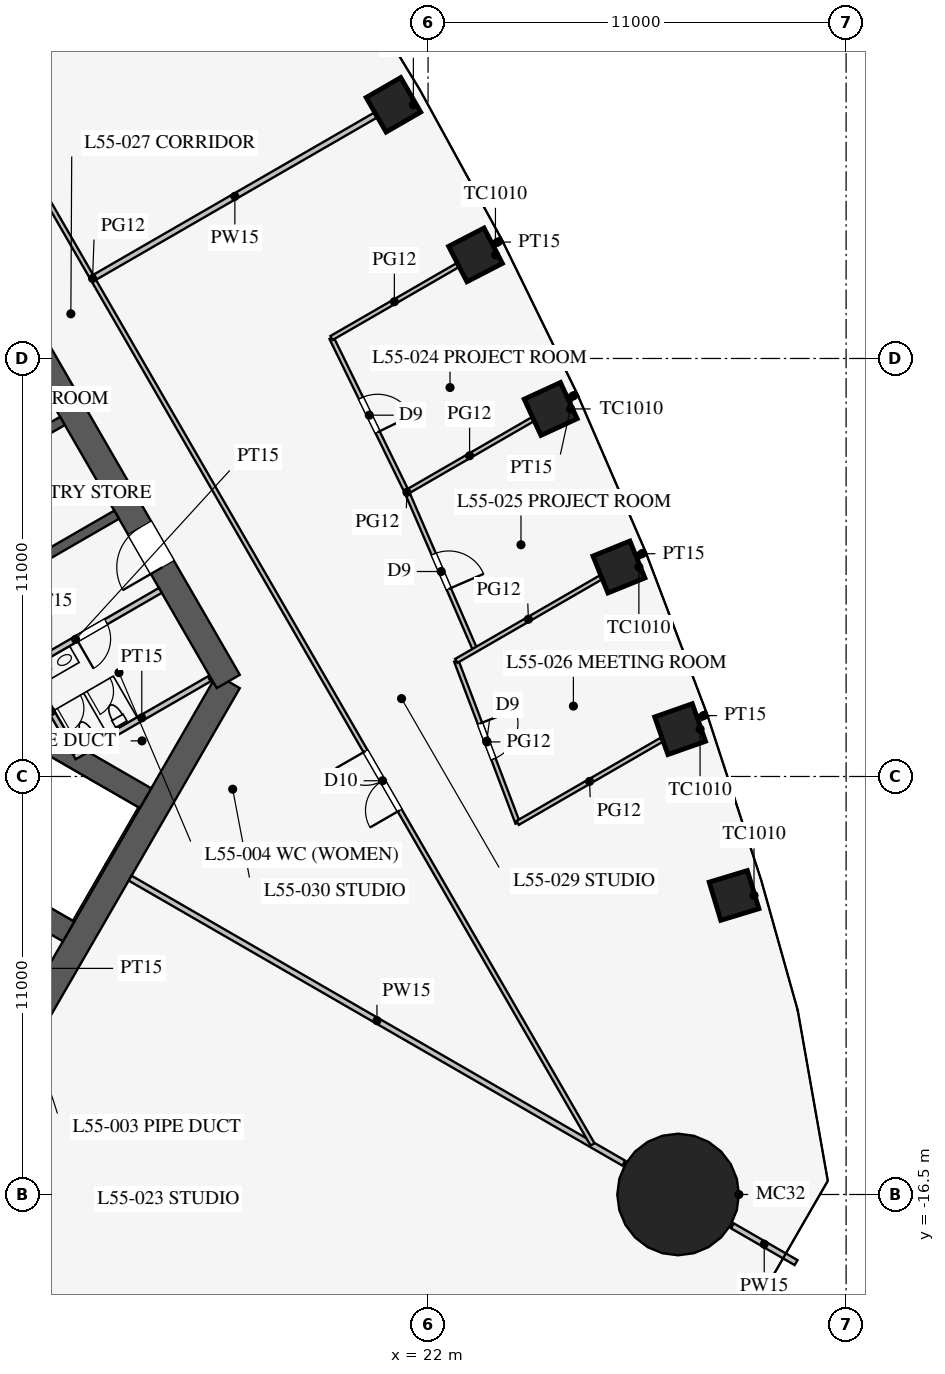
"""IFC4 building model, lengths in metres.
Left out: names, types, materials, properties, quantities, classifications, styles, units other than length and angle.
Written with IfcOpenShell. Run it as: python <this file> out.ifc"""

import sys

from ifc_helpers import new_model, si_unit, direction, frame, frame_2d, origin, origin_2d, place, context, subcontext, project, spatial, rectangle, circle, extrude, element, fill, save


model = new_model("IFC4")
c1 = context("Model", 3, precision=1e-05, world=origin(), true_north=direction((0.0, 1.0)))
c2 = subcontext(c1, "Body", "Model", "MODEL_VIEW")
j1 = project(units=[si_unit("LENGTHUNIT", "METRE"), si_unit("PLANEANGLEUNIT", "RADIAN")], contexts=[c1])
p1 = place(None, origin())
s1 = spatial("IfcSite", under=j1, at=p1, CompositionType="ELEMENT")
p2 = place(p1, origin())
s2 = spatial("IfcBuilding", under=s1, at=p2, CompositionType="ELEMENT")
p3 = place(p2, frame((0.0, 0.0, 240.1)))
s3 = spatial("IfcBuildingStorey", under=s2, at=p3, CompositionType="ELEMENT", Elevation=240.1)
for number, where, z_axis, x_axis in (
    (1, (30.052, -8.63, 0.0), (0.0, 0.0, 1.0), (-0.29, 0.957, 0.0)),
    (2, (28.632, -4.254, 0.0), (0.0, 0.0, 1.0), (-0.332, 0.943, 0.0)),
    (3, (27.022, 0.013, 0.0), (0.0, 0.0, 1.0), (-0.376, 0.927, 0.0)),
    (4, (25.227, 4.172, 0.0), (0.0, 0.0, 1.0), (-0.418, 0.908, 0.0)),
    (5, (23.248, 8.226, 0.0), (0.0, 0.0, 1.0), (-0.46, 0.888, 0.0)),
    (6, (21.088, 12.175, 0.0), (0.0, 0.0, 1.0), (-0.5, 0.866, 0.0)),
):
    element("IfcColumn", number, at=place(p3, frame(where, z_axis=z_axis, x_axis=x_axis)), inside=s3, PredefinedType="COLUMN", context=c2, shape_type="SweptSolid", body=[
        extrude(rectangle(XDim=1.05, YDim=1.05, at=origin_2d()), origin(), (0.0, 0.0, 1.0), 4.2),
    ])
p4 = place(p3, frame((28.579, -16.5, 0.0), z_axis=(0.0, 0.0, 1.0), x_axis=(1.0, 0.0, 0.0)))
e7 = element("IfcColumn", 7, at=p4, inside=s3, PredefinedType="COLUMN", context=c2, shape_type="SweptSolid", body=[
    extrude(circle(Radius=1.6, at=origin_2d()), origin(), (0.0, 0.0, 1.0), 4.2),
])
p5 = place(p3, frame((10.97, -13.0, 0.0), z_axis=(0.0, 0.0, 1.0), x_axis=(0.499995765644, 0.866027848477, 0.0)))
e8 = element("IfcWall", 8, at=p5, inside=s3, PredefinedType="SHEAR", context=c2, shape_type="SweptSolid", body=[
    extrude(rectangle(XDim=11.547, YDim=0.7, at=frame_2d((5.773, 0.0))), origin(), (0.0, 0.0, 1.0), 4.2),
])
p6 = place(p3, frame((16.743, -3.0, 0.0), z_axis=(0.0, 0.0, 1.0), x_axis=(-0.500002442456, 0.866023993627, 0.0)))
e9 = element("IfcWall", 9, at=p6, inside=s3, PredefinedType="SHEAR", context=c2, shape_type="SweptSolid", body=[
    extrude(rectangle(XDim=21.939, YDim=0.7, at=frame_2d((10.97, 0.0))), origin(), (0.0, 0.0, 1.0), 4.2),
])
p7 = place(p6, frame((17.27, 0.0, 0.0)))
e10 = element("IfcOpeningElement", 10, at=p7, cuts=e9, PredefinedType="OPENING", context=c2, shape_type="SweptSolid", body=[
    extrude(rectangle(XDim=1.2, YDim=2.1, at=frame_2d((0.6, 1.05))), frame((0.0, 0.36, 0.0), z_axis=(0.0, -1.0, 0.0), x_axis=(1.0, 0.0, 0.0)), (0.0, 0.0, 1.0), 0.72),
])
p8 = place(p6, frame((3.47, 0.0, 0.0)))
e11 = element("IfcOpeningElement", 11, at=p8, cuts=e9, PredefinedType="OPENING", context=c2, shape_type="SweptSolid", body=[
    extrude(rectangle(XDim=1.2, YDim=2.1, at=frame_2d((0.6, 1.05))), frame((0.0, 0.36, 0.0), z_axis=(0.0, -1.0, 0.0), x_axis=(1.0, 0.0, 0.0)), (0.0, 0.0, 1.0), 0.72),
])
for number, where, z_axis, x_axis in (
    (12, (11.532, 0.076, 0.0), (0.0, 0.0, 1.0), (0.866, 0.5, 0.0)),
    (13, (10.107, 2.544, 0.0), (0.0, 0.0, 1.0), (0.866, 0.5, 0.0)),
):
    element("IfcWall", number, at=place(p3, frame(where, z_axis=z_axis, x_axis=x_axis)), inside=s3, PredefinedType="SHEAR", context=c2, shape_type="SweptSolid", body=[
        extrude(rectangle(XDim=2.625, YDim=0.25, at=frame_2d((1.312, 0.0))), origin(), (0.0, 0.0, 1.0), 4.2),
    ])
for number, where, z_axis, x_axis in (
    (14, (4.638, -5.016, 0.0), (0.0, 0.0, 1.0), (0.866, -0.5, 0.0)),
    (15, (6.663, -1.509, 0.0), (0.0, 0.0, 1.0), (0.866, -0.5, 0.0)),
):
    element("IfcWall", number, at=place(p3, frame(where, z_axis=z_axis, x_axis=x_axis)), inside=s3, PredefinedType="SHEAR", context=c2, shape_type="SweptSolid", body=[
        extrude(rectangle(XDim=9.125, YDim=0.6, at=frame_2d((4.562, 0.0))), origin(), (0.0, 0.0, 1.0), 4.2),
    ])
p9 = place(p3, frame((10.495, -3.178, 0.0), z_axis=(0.0, 0.0, 1.0), x_axis=(0.866037967349, 0.499978238636, 0.0)))
e16 = element("IfcWall", 16, at=p9, inside=s3, PredefinedType="PARTITIONING", context=c2, shape_type="SweptSolid", body=[
    extrude(rectangle(XDim=5.15, YDim=0.15, at=frame_2d((2.575, 0.0))), origin(), (0.0, 0.0, 1.0), 4.0),
])
p10 = place(p9, frame((2.6, 0.0, 0.0)))
e17 = element("IfcOpeningElement", 17, at=p10, cuts=e16, PredefinedType="OPENING", context=c2, shape_type="SweptSolid", body=[
    extrude(rectangle(XDim=0.9, YDim=2.1, at=frame_2d((0.45, 1.05))), frame((0.0, 0.085, 0.0), z_axis=(0.0, -1.0, 0.0), x_axis=(1.0, 0.0, 0.0)), (0.0, 0.0, 1.0), 0.17),
])
p11 = place(p3, frame((12.691, -4.982, 0.0), z_axis=(0.0, 0.0, 1.0), x_axis=(0.8660249478, 0.500000789788, 0.0)))
e18 = element("IfcWall", 18, at=p11, inside=s3, PredefinedType="PARTITIONING", context=c2, shape_type="SweptSolid", body=[
    extrude(rectangle(XDim=4.1, YDim=0.15, at=frame_2d((2.05, 0.0))), origin(), (0.0, 0.0, 1.0), 4.0),
])
p12 = place(p3, frame((11.464, -2.706, 0.0), z_axis=(0.0, 0.0, 1.0), x_axis=(0.50001992892, -0.866013897511, 0.0)))
e19 = element("IfcWall", 19, at=p12, inside=s3, PredefinedType="PARTITIONING", context=c2, shape_type="SweptSolid", body=[
    extrude(rectangle(XDim=2.51, YDim=0.15, at=frame_2d((1.255, 0.0))), origin(), (0.0, 0.0, 1.0), 4.0),
])
p13 = place(p3, frame((14.159, -8.175, 0.0), z_axis=(0.0, 0.0, 1.0), x_axis=(0.866027028085, -0.499997186618, 0.0)))
e20 = element("IfcWall", 20, at=p13, inside=s3, PredefinedType="PARTITIONING", context=c2, shape_type="SweptSolid", body=[
    extrude(rectangle(XDim=15.0, YDim=0.15, at=frame_2d((7.5, 0.0))), origin(), (0.0, 0.0, 1.0), 2.4),
])
p14 = place(p3, frame((30.008, -17.325, 0.0), z_axis=(0.0, 0.0, 1.0), x_axis=(0.866013246922, -0.500021055713, 0.0)))
e21 = element("IfcWall", 21, at=p14, inside=s3, PredefinedType="PARTITIONING", context=c2, shape_type="SweptSolid", body=[
    extrude(rectangle(XDim=1.935, YDim=0.15, at=frame_2d((0.967, 0.0))), origin(), (0.0, 0.0, 1.0), 2.4),
])
p15 = place(p3, frame((13.224, 7.635, 0.0), z_axis=(0.0, 0.0, 1.0), x_axis=(0.866035375346, 0.499982728352, 0.0)))
e22 = element("IfcWall", 22, at=p15, inside=s3, PredefinedType="PARTITIONING", context=c2, shape_type="SweptSolid", body=[
    extrude(rectangle(XDim=8.526, YDim=0.15, at=frame_2d((4.263, 0.0))), origin(), (0.0, 0.0, 1.0), 2.992),
])
p16 = place(p3, frame((26.328, -15.182, 0.0), z_axis=(0.0, 0.0, 1.0), x_axis=(-0.500000626146, 0.866025042278, 0.0)))
e23 = element("IfcWall", 23, at=p16, inside=s3, PredefinedType="PARTITIONING", context=c2, shape_type="SweptSolid", body=[
    extrude(rectangle(XDim=52.624, YDim=0.12, at=frame_2d((26.312, 0.0))), origin(), (0.0, 0.0, 1.0), 2.9),
])
p17 = place(p16, frame((10.15, 0.0, 0.15)))
e24 = element("IfcOpeningElement", 24, at=p17, cuts=e23, PredefinedType="OPENING", context=c2, shape_type="SweptSolid", body=[
    extrude(rectangle(XDim=1.8, YDim=2.1, at=frame_2d((0.9, 1.05))), frame((0.0, 0.07, 0.0), z_axis=(0.0, -1.0, 0.0), x_axis=(1.0, 0.0, 0.0)), (0.0, 0.0, 1.0), 0.14),
])
p18 = place(p16, frame((40.65, 0.0, 0.15)))
e25 = element("IfcOpeningElement", 25, at=p18, cuts=e23, PredefinedType="OPENING", context=c2, shape_type="SweptSolid", body=[
    extrude(rectangle(XDim=1.8, YDim=2.1, at=frame_2d((0.9, 1.05))), frame((0.0, 0.07, 0.0), z_axis=(0.0, -1.0, 0.0), x_axis=(1.0, 0.0, 0.0)), (0.0, 0.0, 1.0), 0.14),
])
p19 = place(p3, frame((27.539, 0.311, 0.0), z_axis=(0.0, 0.0, 1.0), x_axis=(0.865534352121, 0.500849563539, 0.0)))
e26 = element("IfcWall", 26, at=p19, inside=s3, PredefinedType="PARTITIONING", context=c2, shape_type="SweptSolid", body=[
    extrude(rectangle(XDim=0.206, YDim=0.15, at=frame_2d((0.103, 0.0))), origin(), (0.0, 0.0, 1.0), 2.9),
])
p20 = place(p3, frame((29.166, -3.946, 0.0), z_axis=(0.0, 0.0, 1.0), x_axis=(0.866439280089, 0.499282459054, 0.0)))
e27 = element("IfcWall", 27, at=p20, inside=s3, PredefinedType="PARTITIONING", context=c2, shape_type="SweptSolid", body=[
    extrude(rectangle(XDim=0.192, YDim=0.15, at=frame_2d((0.096, 0.0))), origin(), (0.0, 0.0, 1.0), 2.9),
])
p21 = place(p3, frame((23.727, 8.502, 0.0), z_axis=(0.0, 0.0, 1.0), x_axis=(0.866135455726, 0.499809335981, 0.0)))
e28 = element("IfcWall", 28, at=p21, inside=s3, PredefinedType="PARTITIONING", context=c2, shape_type="SweptSolid", body=[
    extrude(rectangle(XDim=0.243, YDim=0.15, at=frame_2d((0.122, 0.0))), origin(), (0.0, 0.0, 1.0), 2.9),
])
p22 = place(p3, frame((25.725, 4.46, 0.0), z_axis=(0.0, 0.0, 1.0), x_axis=(0.865675623716, 0.500605348058, 0.0)))
e29 = element("IfcWall", 29, at=p22, inside=s3, PredefinedType="PARTITIONING", context=c2, shape_type="SweptSolid", body=[
    extrude(rectangle(XDim=0.223, YDim=0.15, at=frame_2d((0.112, 0.0))), origin(), (0.0, 0.0, 1.0), 2.9),
])
p23 = place(p3, frame((23.24, -2.171, 0.0), z_axis=(0.0, 0.0, 1.0), x_axis=(-0.397188455592, 0.917737070595, 0.0)))
e30 = element("IfcWall", 30, at=p23, inside=s3, PredefinedType="PARTITIONING", context=c2, shape_type="SweptSolid", body=[
    extrude(rectangle(XDim=4.53, YDim=0.12, at=frame_2d((2.265, 0.0))), origin(), (0.0, 0.0, 1.0), 2.9),
])
p24 = place(p23, frame((1.75, 0.0, 0.15)))
e31 = element("IfcOpeningElement", 31, at=p24, cuts=e30, PredefinedType="OPENING", context=c2, shape_type="SweptSolid", body=[
    extrude(rectangle(XDim=1.0, YDim=2.1, at=frame_2d((0.5, 1.05))), frame((0.0, 0.07, 0.0), z_axis=(0.0, -1.0, 0.0), x_axis=(1.0, 0.0, 0.0)), (0.0, 0.0, 1.0), 0.14),
])
p25 = place(p3, frame((24.357, -6.722, 0.0), z_axis=(0.0, 0.0, 1.0), x_axis=(-0.354219967303, 0.935162132875, 0.0)))
e32 = element("IfcWall", 32, at=p25, inside=s3, PredefinedType="PARTITIONING", context=c2, shape_type="SweptSolid", body=[
    extrude(rectangle(XDim=4.559, YDim=0.12, at=frame_2d((2.28, 0.0))), origin(), (0.0, 0.0, 1.0), 2.9),
])
p26 = place(p25, frame((1.8, 0.0, 0.15)))
e33 = element("IfcOpeningElement", 33, at=p26, cuts=e32, PredefinedType="OPENING", context=c2, shape_type="SweptSolid", body=[
    extrude(rectangle(XDim=1.0, YDim=2.1, at=frame_2d((0.5, 1.05))), frame((0.0, 0.07, 0.0), z_axis=(0.0, -1.0, 0.0), x_axis=(1.0, 0.0, 0.0)), (0.0, 0.0, 1.0), 0.14),
])
p27 = place(p3, frame((21.441, 1.987, 0.0), z_axis=(0.0, 0.0, 1.0), x_axis=(-0.43911984878, 0.898428493764, 0.0)))
e34 = element("IfcWall", 34, at=p27, inside=s3, PredefinedType="PARTITIONING", context=c2, shape_type="SweptSolid", body=[
    extrude(rectangle(XDim=4.511, YDim=0.12, at=frame_2d((2.255, 0.0))), origin(), (0.0, 0.0, 1.0), 2.9),
])
p28 = place(p27, frame((1.75, 0.0, 0.15)))
e35 = element("IfcOpeningElement", 35, at=p28, cuts=e34, PredefinedType="OPENING", context=c2, shape_type="SweptSolid", body=[
    extrude(rectangle(XDim=1.0, YDim=2.1, at=frame_2d((0.5, 1.05))), frame((0.0, 0.07, 0.0), z_axis=(0.0, -1.0, 0.0), x_axis=(1.0, 0.0, 0.0)), (0.0, 0.0, 1.0), 0.14),
])
p29 = place(p3, frame((22.742, -2.458, 0.0), z_axis=(0.0, 0.0, 1.0), x_axis=(0.866033427365, 0.499986102494, 0.0)))
e36 = element("IfcWall", 36, at=p29, inside=s3, PredefinedType="PARTITIONING", context=c2, shape_type="SweptSolid", body=[
    extrude(rectangle(XDim=4.382, YDim=0.12, at=frame_2d((2.191, 0.0))), origin(), (0.0, 0.0, 1.0), 2.8),
])
p30 = place(p3, frame((24.357, -6.722, 0.0), z_axis=(0.0, 0.0, 1.0), x_axis=(0.866024693403, 0.500001230415, 0.0)))
e37 = element("IfcWall", 37, at=p30, inside=s3, PredefinedType="PARTITIONING", context=c2, shape_type="SweptSolid", body=[
    extrude(rectangle(XDim=4.372, YDim=0.12, at=frame_2d((2.186, 0.0))), origin(), (0.0, 0.0, 1.0), 2.8),
])
p31 = place(p3, frame((19.46, 6.039, 0.0), z_axis=(0.0, 0.0, 1.0), x_axis=(0.866031201001, 0.499989958791, 0.0)))
e38 = element("IfcWall", 38, at=p31, inside=s3, PredefinedType="PARTITIONING", context=c2, shape_type="SweptSolid", body=[
    extrude(rectangle(XDim=3.818, YDim=0.12, at=frame_2d((1.909, 0.0))), origin(), (0.0, 0.0, 1.0), 2.9),
])
p32 = place(p3, frame((21.441, 1.987, 0.0), z_axis=(0.0, 0.0, 1.0), x_axis=(0.866040623776, 0.499973637274, 0.0)))
e39 = element("IfcWall", 39, at=p32, inside=s3, PredefinedType="PARTITIONING", context=c2, shape_type="SweptSolid", body=[
    extrude(rectangle(XDim=3.814, YDim=0.12, at=frame_2d((1.907, 0.0))), origin(), (0.0, 0.0, 1.0), 2.9),
])
p33 = place(p10, frame((0.9, 0.0, 0.0), z_axis=(0.0, 0.0, 1.0), x_axis=(-1.0, 0.0, 0.0)))
e40 = element("IfcDoor", 40, at=p33, inside=s3, OperationType="SINGLE_SWING_RIGHT", PredefinedType="DOOR", context=c2, shape_type="SweptSolid", body=[
    extrude(rectangle(XDim=0.9, YDim=2.1, at=frame_2d((0.45, 1.05))), frame((0.0, 0.025, 0.0), z_axis=(0.0, -1.0, 0.0), x_axis=(1.0, 0.0, 0.0)), (0.0, 0.0, 1.0), 0.05),
])
fill(e17, e40)
p34 = place(p8, origin())
e41 = element("IfcDoor", 41, at=p34, inside=s3, OperationType="SINGLE_SWING_LEFT", PredefinedType="DOOR", context=c2, shape_type="SweptSolid", body=[
    extrude(rectangle(XDim=1.2, YDim=2.1, at=frame_2d((0.6, 1.05))), frame((0.0, 0.025, 0.0), z_axis=(0.0, -1.0, 0.0), x_axis=(1.0, 0.0, 0.0)), (0.0, 0.0, 1.0), 0.05),
])
fill(e11, e41)
p35 = place(p28, frame((1.0, 0.0, 0.0), z_axis=(0.0, 0.0, 1.0), x_axis=(-1.0, 0.0, 0.0)))
e42 = element("IfcDoor", 42, at=p35, inside=s3, OperationType="SINGLE_SWING_RIGHT", PredefinedType="DOOR", context=c2, shape_type="SweptSolid", body=[
    extrude(rectangle(XDim=1.0, YDim=2.1, at=frame_2d((0.5, 1.05))), frame((0.0, 0.025, 0.0), z_axis=(0.0, -1.0, 0.0), x_axis=(1.0, 0.0, 0.0)), (0.0, 0.0, 1.0), 0.05),
])
fill(e35, e42)
p36 = place(p24, frame((1.0, 0.0, 0.0), z_axis=(0.0, 0.0, 1.0), x_axis=(-1.0, 0.0, 0.0)))
e43 = element("IfcDoor", 43, at=p36, inside=s3, OperationType="SINGLE_SWING_RIGHT", PredefinedType="DOOR", context=c2, shape_type="SweptSolid", body=[
    extrude(rectangle(XDim=1.0, YDim=2.1, at=frame_2d((0.5, 1.05))), frame((0.0, 0.025, 0.0), z_axis=(0.0, -1.0, 0.0), x_axis=(1.0, 0.0, 0.0)), (0.0, 0.0, 1.0), 0.05),
])
fill(e31, e43)
p37 = place(p26, frame((1.0, 0.0, 0.0), z_axis=(0.0, 0.0, 1.0), x_axis=(-1.0, 0.0, 0.0)))
e44 = element("IfcDoor", 44, at=p37, inside=s3, OperationType="SINGLE_SWING_LEFT", PredefinedType="DOOR", context=c2, shape_type="SweptSolid", body=[
    extrude(rectangle(XDim=1.0, YDim=2.1, at=frame_2d((0.5, 1.05))), frame((0.0, 0.025, 0.0), z_axis=(0.0, -1.0, 0.0), x_axis=(1.0, 0.0, 0.0)), (0.0, 0.0, 1.0), 0.05),
])
fill(e33, e44)
p38 = place(p17, origin())
e45 = element("IfcDoor", 45, at=p38, inside=s3, OperationType="DOUBLE_DOOR_SINGLE_SWING", PredefinedType="DOOR", context=c2, shape_type="SweptSolid", body=[
    extrude(rectangle(XDim=1.8, YDim=2.1, at=frame_2d((0.9, 1.05))), frame((0.0, 0.025, 0.0), z_axis=(0.0, -1.0, 0.0), x_axis=(1.0, 0.0, 0.0)), (0.0, 0.0, 1.0), 0.05),
])
fill(e24, e45)
save(model, sys.argv[1])
